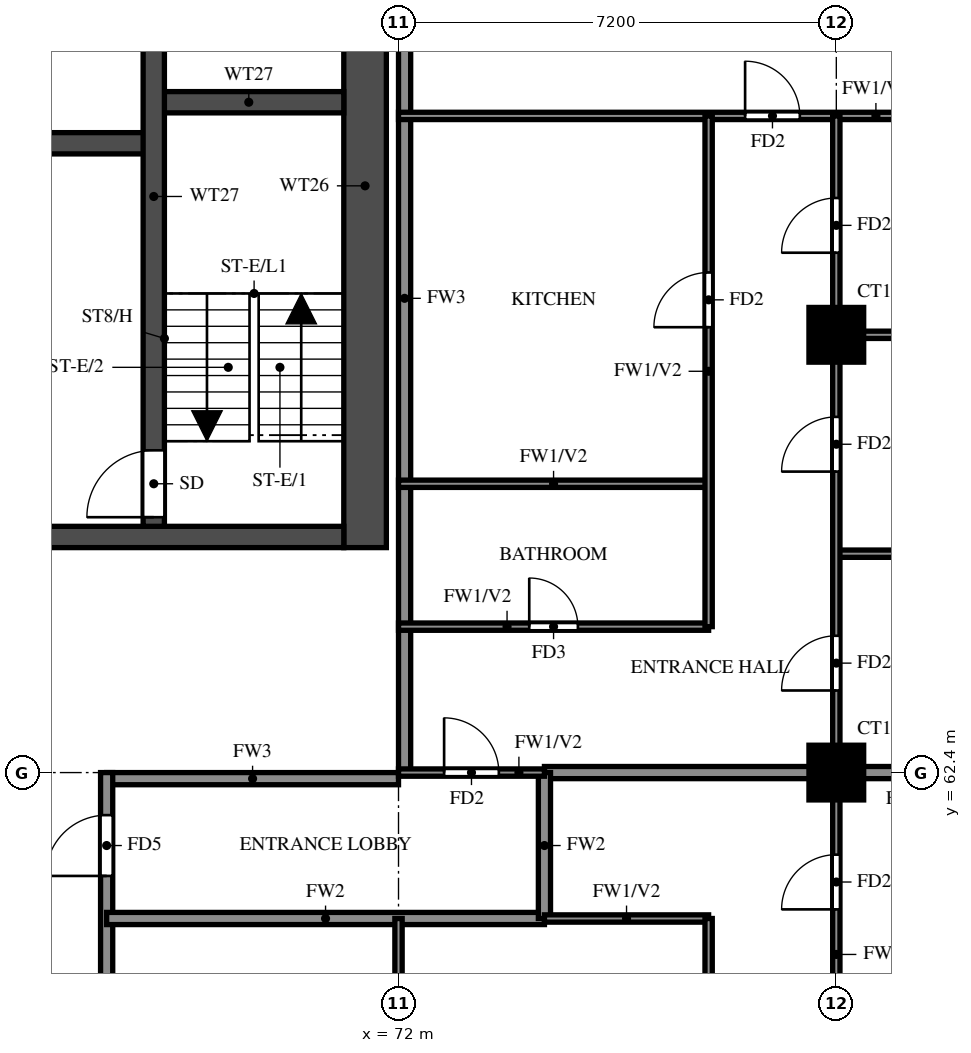
"""IFC4 building model, lengths in metres.
Left out: names, types, materials, properties, quantities, classifications, styles, units other than length and angle.
Written with IfcOpenShell. Run it as: python <this file> out.ifc"""

import sys

from ifc_helpers import new_model, si_unit, direction, frame, frame_2d, origin, origin_2d, place, context, subcontext, project, spatial, rectangle, extrude, source, transform, mapped, element, fill, save


model = new_model("IFC4")
c1 = context("Model", 3, precision=1e-05, world=origin(), true_north=direction((0.0, 1.0)))
c2 = subcontext(c1, "Body", "Model", "MODEL_VIEW")
j1 = project(units=[si_unit("LENGTHUNIT", "METRE"), si_unit("PLANEANGLEUNIT", "RADIAN")], contexts=[c1])
p1 = place(None, origin())
s1 = spatial("IfcSite", under=j1, at=p1, CompositionType="ELEMENT")
p2 = place(p1, origin())
s2 = spatial("IfcBuilding", under=s1, at=p2, CompositionType="ELEMENT")
p3 = place(p2, frame((0.0, 0.0, 188.5)))
s3 = spatial("IfcBuildingStorey", under=s2, at=p3, CompositionType="ELEMENT", Elevation=188.5)
m1 = source(origin(), c2, "Body", "SweptSolid", [
    extrude(rectangle(XDim=0.9, YDim=0.9, at=origin_2d()), origin(), (0.0, 0.0, 1.0), 3.2),
])
for number, where, z_axis, x_axis in (
    (1, (79.2, 62.4, 0.0), (0.0, 0.0, 1.0), (1.0, 0.0, 0.0)),
    (2, (79.2, 69.6, 0.0), (0.0, 0.0, 1.0), (1.0, 0.0, 0.0)),
):
    element("IfcColumn", number, at=place(p3, frame(where, z_axis=z_axis, x_axis=x_axis)), inside=s3, PredefinedType="COLUMN", context=c2, shape_type="MappedRepresentation", body=[
        mapped(m1, transform((0.0, 0.0, 0.0))),
    ])
p4 = place(p3, frame((71.45, 66.1, 0.0), z_axis=(0.0, 0.0, 1.0), x_axis=(0.0, 1.0, 0.0)))
e3 = element("IfcWall", 3, at=p4, inside=s3, PredefinedType="SHEAR", context=c2, shape_type="SweptSolid", body=[
    extrude(rectangle(XDim=11.9, YDim=0.7, at=frame_2d((5.95, 0.0))), origin(), (0.0, 0.0, 1.0), 3.2),
])
p5 = place(p3, frame((29.7, 66.275, 0.0), z_axis=(0.0, 0.0, 1.0), x_axis=(1.0, 0.0, 0.0)))
e4 = element("IfcWall", 4, at=p5, inside=s3, PredefinedType="SHEAR", context=c2, shape_type="SweptSolid", body=[
    extrude(rectangle(XDim=41.4, YDim=0.35, at=frame_2d((20.7, 0.0))), origin(), (0.0, 0.0, 1.0), 3.2),
])
p6 = place(p5, frame((0.925, 0.0, 0.0)))
e5 = element("IfcOpeningElement", 5, at=p6, cuts=e4, PredefinedType="OPENING", context=c2, shape_type="SweptSolid", body=[
    extrude(rectangle(XDim=1.1, YDim=2.1, at=frame_2d((0.55, 1.05))), frame((0.0, 0.185, 0.0), z_axis=(0.0, -1.0, 0.0), x_axis=(1.0, 0.0, 0.0)), (0.0, 0.0, 1.0), 0.37),
])
p7 = place(p5, frame((3.712, 0.0, 0.0)))
e6 = element("IfcOpeningElement", 6, at=p7, cuts=e4, PredefinedType="OPENING", context=c2, shape_type="SweptSolid", body=[
    extrude(rectangle(XDim=1.8, YDim=2.1, at=frame_2d((0.9, 1.05))), frame((0.0, 0.185, 0.0), z_axis=(0.0, -1.0, 0.0), x_axis=(1.0, 0.0, 0.0)), (0.0, 0.0, 1.0), 0.37),
])
p8 = place(p3, frame((32.825, 72.75, 0.0), z_axis=(0.0, 0.0, 1.0), x_axis=(1.0, 0.0, 0.0)))
e7 = element("IfcWall", 7, at=p8, inside=s3, PredefinedType="SHEAR", context=c2, shape_type="SweptSolid", body=[
    extrude(rectangle(XDim=35.15, YDim=0.35, at=frame_2d((17.575, 0.0))), origin(), (0.0, 0.0, 1.0), 3.2),
])
p9 = place(p8, frame((19.8, 0.0, 0.0)))
e8 = element("IfcOpeningElement", 8, at=p9, cuts=e7, PredefinedType="OPENING", context=c2, shape_type="SweptSolid", body=[
    extrude(rectangle(XDim=1.1, YDim=2.1, at=frame_2d((0.55, 1.05))), frame((0.0, 0.185, 0.0), z_axis=(0.0, -1.0, 0.0), x_axis=(1.0, 0.0, 0.0)), (0.0, 0.0, 1.0), 0.37),
])
p10 = place(p8, frame((27.7, 0.0, 0.0)))
e9 = element("IfcOpeningElement", 9, at=p10, cuts=e7, PredefinedType="OPENING", context=c2, shape_type="SweptSolid", body=[
    extrude(rectangle(XDim=1.1, YDim=2.1, at=frame_2d((0.55, 1.05))), frame((0.0, 0.185, 0.0), z_axis=(0.0, -1.0, 0.0), x_axis=(1.0, 0.0, 0.0)), (0.0, 0.0, 1.0), 0.37),
])
p11 = place(p8, frame((30.3, 0.0, 0.0)))
e10 = element("IfcOpeningElement", 10, at=p11, cuts=e7, PredefinedType="OPENING", context=c2, shape_type="SweptSolid", body=[
    extrude(rectangle(XDim=1.1, YDim=2.1, at=frame_2d((0.55, 1.05))), frame((0.0, 0.185, 0.0), z_axis=(0.0, -1.0, 0.0), x_axis=(1.0, 0.0, 0.0)), (0.0, 0.0, 1.0), 0.37),
])
p12 = place(p8, frame((3.8, 0.0, 0.0)))
e11 = element("IfcOpeningElement", 11, at=p12, cuts=e7, PredefinedType="OPENING", context=c2, shape_type="SweptSolid", body=[
    extrude(rectangle(XDim=1.1, YDim=2.1, at=frame_2d((0.55, 1.05))), frame((0.0, 0.185, 0.0), z_axis=(0.0, -1.0, 0.0), x_axis=(1.0, 0.0, 0.0)), (0.0, 0.0, 1.0), 0.37),
])
p13 = place(p8, frame((6.55, 0.0, 0.0)))
e12 = element("IfcOpeningElement", 12, at=p13, cuts=e7, PredefinedType="OPENING", context=c2, shape_type="SweptSolid", body=[
    extrude(rectangle(XDim=1.1, YDim=2.1, at=frame_2d((0.55, 1.05))), frame((0.0, 0.185, 0.0), z_axis=(0.0, -1.0, 0.0), x_axis=(1.0, 0.0, 0.0)), (0.0, 0.0, 1.0), 0.37),
])
p14 = place(p8, frame((9.3, 0.0, 0.0)))
e13 = element("IfcOpeningElement", 13, at=p14, cuts=e7, PredefinedType="OPENING", context=c2, shape_type="SweptSolid", body=[
    extrude(rectangle(XDim=1.1, YDim=2.1, at=frame_2d((0.55, 1.05))), frame((0.0, 0.185, 0.0), z_axis=(0.0, -1.0, 0.0), x_axis=(1.0, 0.0, 0.0)), (0.0, 0.0, 1.0), 0.37),
])
p15 = place(p8, frame((12.05, 0.0, 0.0)))
e14 = element("IfcOpeningElement", 14, at=p15, cuts=e7, PredefinedType="OPENING", context=c2, shape_type="SweptSolid", body=[
    extrude(rectangle(XDim=1.1, YDim=2.1, at=frame_2d((0.55, 1.05))), frame((0.0, 0.185, 0.0), z_axis=(0.0, -1.0, 0.0), x_axis=(1.0, 0.0, 0.0)), (0.0, 0.0, 1.0), 0.37),
])
p16 = place(p8, frame((14.8, 0.0, 0.0)))
e15 = element("IfcOpeningElement", 15, at=p16, cuts=e7, PredefinedType="OPENING", context=c2, shape_type="SweptSolid", body=[
    extrude(rectangle(XDim=1.1, YDim=2.1, at=frame_2d((0.55, 1.05))), frame((0.0, 0.185, 0.0), z_axis=(0.0, -1.0, 0.0), x_axis=(1.0, 0.0, 0.0)), (0.0, 0.0, 1.0), 0.37),
])
p17 = place(p8, frame((17.55, 0.0, 0.0)))
e16 = element("IfcOpeningElement", 16, at=p17, cuts=e7, PredefinedType="OPENING", context=c2, shape_type="SweptSolid", body=[
    extrude(rectangle(XDim=1.1, YDim=2.1, at=frame_2d((0.55, 1.05))), frame((0.0, 0.185, 0.0), z_axis=(0.0, -1.0, 0.0), x_axis=(1.0, 0.0, 0.0)), (0.0, 0.0, 1.0), 0.37),
])
p18 = place(p8, frame((0.938, 0.0, 0.0)))
e17 = element("IfcOpeningElement", 17, at=p18, cuts=e7, PredefinedType="OPENING", context=c2, shape_type="SweptSolid", body=[
    extrude(rectangle(XDim=1.1, YDim=2.1, at=frame_2d((0.55, 1.05))), frame((0.0, 0.185, 0.0), z_axis=(0.0, -1.0, 0.0), x_axis=(1.0, 0.0, 0.0)), (0.0, 0.0, 1.0), 0.37),
])
p19 = place(p3, frame((67.975, 73.425, 0.0), z_axis=(0.0, 0.0, 1.0), x_axis=(1.0, 0.0, 0.0)))
e18 = element("IfcWall", 18, at=p19, inside=s3, PredefinedType="SHEAR", context=c2, shape_type="SweptSolid", body=[
    extrude(rectangle(XDim=3.125, YDim=0.35, at=frame_2d((1.562, 0.0))), origin(), (0.0, 0.0, 1.0), 3.2),
])
p20 = place(p3, frame((67.975, 66.45, 0.0), z_axis=(0.0, 0.0, 1.0), x_axis=(0.0, 1.0, 0.0)))
e19 = element("IfcWall", 19, at=p20, inside=s3, PredefinedType="SHEAR", context=c2, shape_type="SweptSolid", body=[
    extrude(rectangle(XDim=10.85, YDim=0.35, at=frame_2d((5.425, 0.0))), origin(), (0.0, 0.0, 1.0), 3.2),
])
p21 = place(p20, frame((0.15, 0.0, 0.0)))
e20 = element("IfcOpeningElement", 20, at=p21, cuts=e19, PredefinedType="OPENING", context=c2, shape_type="SweptSolid", body=[
    extrude(rectangle(XDim=1.1, YDim=2.1, at=frame_2d((0.55, 1.05))), frame((0.0, 0.185, 0.0), z_axis=(0.0, -1.0, 0.0), x_axis=(1.0, 0.0, 0.0)), (0.0, 0.0, 1.0), 0.37),
])
p22 = place(p3, frame((67.2, 62.3, 0.0), z_axis=(0.0, 0.0, 1.0), x_axis=(1.0, 0.0, 0.0)))
e21 = element("IfcWall", 21, at=p22, inside=s3, PredefinedType="SOLIDWALL", context=c2, shape_type="SweptSolid", body=[
    extrude(rectangle(XDim=4.8, YDim=0.2, at=frame_2d((2.4, 0.0))), origin(), (0.0, 0.0, 1.0), 3.2),
])
p23 = place(p3, frame((67.2, 45.6, 0.0), z_axis=(0.0, 0.0, 1.0), x_axis=(0.0, 1.0, 0.0)))
e22 = element("IfcWall", 22, at=p23, inside=s3, PredefinedType="SOLIDWALL", context=c2, shape_type="SweptSolid", body=[
    extrude(rectangle(XDim=16.8, YDim=0.2, at=frame_2d((8.4, 0.0))), origin(), (0.0, 0.0, 1.0), 3.2),
])
p24 = place(p23, frame((8.3, 0.0, 0.0)))
e23 = element("IfcOpeningElement", 23, at=p24, cuts=e22, PredefinedType="OPENING", context=c2, shape_type="SweptSolid", body=[
    extrude(rectangle(XDim=1.0, YDim=2.1, at=frame_2d((0.5, 1.05))), frame((0.0, 0.11, 0.0), z_axis=(0.0, -1.0, 0.0), x_axis=(1.0, 0.0, 0.0)), (0.0, 0.0, 1.0), 0.22),
])
p25 = place(p23, frame((15.1, 0.0, 0.0)))
e24 = element("IfcOpeningElement", 24, at=p25, cuts=e22, PredefinedType="OPENING", context=c2, shape_type="SweptSolid", body=[
    extrude(rectangle(XDim=1.0, YDim=2.1, at=frame_2d((0.5, 1.05))), frame((0.0, 0.11, 0.0), z_axis=(0.0, -1.0, 0.0), x_axis=(1.0, 0.0, 0.0)), (0.0, 0.0, 1.0), 0.22),
])
p26 = place(p23, frame((0.7, 0.0, 0.0)))
e25 = element("IfcOpeningElement", 25, at=p26, cuts=e22, PredefinedType="OPENING", context=c2, shape_type="SweptSolid", body=[
    extrude(rectangle(XDim=1.0, YDim=2.1, at=frame_2d((0.5, 1.05))), frame((0.0, 0.11, 0.0), z_axis=(0.0, -1.0, 0.0), x_axis=(1.0, 0.0, 0.0)), (0.0, 0.0, 1.0), 0.22),
])
p27 = place(p3, frame((72.1, 62.4, 0.0), z_axis=(0.0, 0.0, 1.0), x_axis=(0.0, 1.0, 0.0)))
e26 = element("IfcWall", 26, at=p27, inside=s3, PredefinedType="SOLIDWALL", context=c2, shape_type="SweptSolid", body=[
    extrude(rectangle(XDim=15.6, YDim=0.2, at=frame_2d((7.8, 0.0))), origin(), (0.0, 0.0, 1.0), 3.2),
])
p28 = place(p3, frame((67.2, 60.0, 0.0), z_axis=(0.0, 0.0, 1.0), x_axis=(1.0, 0.0, 0.0)))
e27 = element("IfcWall", 27, at=p28, inside=s3, PredefinedType="SOLIDWALL", context=c2, shape_type="SweptSolid", body=[
    extrude(rectangle(XDim=7.2, YDim=0.2, at=frame_2d((3.6, 0.0))), origin(), (0.0, 0.0, 1.0), 3.2),
])
p29 = place(p3, frame((74.4, 62.4, 0.0), z_axis=(0.0, 0.0, 1.0), x_axis=(1.0, 0.0, 0.0)))
e28 = element("IfcWall", 28, at=p29, inside=s3, PredefinedType="SOLIDWALL", context=c2, shape_type="SweptSolid", body=[
    extrude(rectangle(XDim=11.875, YDim=0.2, at=frame_2d((5.938, 0.0))), origin(), (0.0, 0.0, 1.0), 3.2),
])
p30 = place(p3, frame((74.4, 60.0, 0.0), z_axis=(0.0, 0.0, 1.0), x_axis=(0.0, 1.0, 0.0)))
e29 = element("IfcWall", 29, at=p30, inside=s3, PredefinedType="SOLIDWALL", context=c2, shape_type="SweptSolid", body=[
    extrude(rectangle(XDim=2.4, YDim=0.2, at=frame_2d((1.2, 0.0))), origin(), (0.0, 0.0, 1.0), 3.2),
])
p31 = place(p3, frame((74.4, 60.0, 0.0), z_axis=(0.0, 0.0, 1.0), x_axis=(1.0, 0.0, 0.0)))
e30 = element("IfcWall", 30, at=p31, inside=s3, PredefinedType="PARTITIONING", context=c2, shape_type="SweptSolid", body=[
    extrude(rectangle(XDim=2.7, YDim=0.12, at=frame_2d((1.35, 0.0))), origin(), (0.0, 0.0, 1.0), 3.2),
])
p32 = place(p3, frame((72.0, 62.4, 0.0), z_axis=(0.0, 0.0, 1.0), x_axis=(1.0, 0.0, 0.0)))
e31 = element("IfcWall", 31, at=p32, inside=s3, PredefinedType="PARTITIONING", context=c2, shape_type="SweptSolid", body=[
    extrude(rectangle(XDim=2.4, YDim=0.12, at=frame_2d((1.2, 0.0))), origin(), (0.0, 0.0, 1.0), 3.2),
])
p33 = place(p32, frame((0.75, 0.0, 0.0)))
e32 = element("IfcOpeningElement", 32, at=p33, cuts=e31, PredefinedType="OPENING", context=c2, shape_type="SweptSolid", body=[
    extrude(rectangle(XDim=0.9, YDim=2.1, at=frame_2d((0.45, 1.05))), frame((0.0, 0.07, 0.0), z_axis=(0.0, -1.0, 0.0), x_axis=(1.0, 0.0, 0.0)), (0.0, 0.0, 1.0), 0.14),
])
p34 = place(p3, frame((72.0, 64.8, 0.0), z_axis=(0.0, 0.0, 1.0), x_axis=(1.0, 0.0, 0.0)))
e33 = element("IfcWall", 33, at=p34, inside=s3, PredefinedType="PARTITIONING", context=c2, shape_type="SweptSolid", body=[
    extrude(rectangle(XDim=5.1, YDim=0.12, at=frame_2d((2.55, 0.0))), origin(), (0.0, 0.0, 1.0), 3.2),
])
p35 = place(p34, frame((2.15, 0.0, 0.0)))
e34 = element("IfcOpeningElement", 34, at=p35, cuts=e33, PredefinedType="OPENING", context=c2, shape_type="SweptSolid", body=[
    extrude(rectangle(XDim=0.8, YDim=2.1, at=frame_2d((0.4, 1.05))), frame((0.0, 0.07, 0.0), z_axis=(0.0, -1.0, 0.0), x_axis=(1.0, 0.0, 0.0)), (0.0, 0.0, 1.0), 0.14),
])
p36 = place(p3, frame((79.2, 66.0, 0.0), z_axis=(0.0, 0.0, 1.0), x_axis=(1.0, 0.0, 0.0)))
e35 = element("IfcWall", 35, at=p36, inside=s3, PredefinedType="PARTITIONING", context=c2, shape_type="SweptSolid", body=[
    extrude(rectangle(XDim=7.075, YDim=0.12, at=frame_2d((3.538, 0.0))), origin(), (0.0, 0.0, 1.0), 2.3),
])
p37 = place(p3, frame((72.0, 67.15, 0.0), z_axis=(0.0, 0.0, 1.0), x_axis=(1.0, 0.0, 0.0)))
e36 = element("IfcWall", 36, at=p37, inside=s3, PredefinedType="PARTITIONING", context=c2, shape_type="SweptSolid", body=[
    extrude(rectangle(XDim=5.1, YDim=0.12, at=frame_2d((2.55, 0.0))), origin(), (0.0, 0.0, 1.0), 3.2),
])
p38 = place(p3, frame((79.2, 69.6, 0.0), z_axis=(0.0, 0.0, 1.0), x_axis=(1.0, 0.0, 0.0)))
e37 = element("IfcWall", 37, at=p38, inside=s3, PredefinedType="PARTITIONING", context=c2, shape_type="SweptSolid", body=[
    extrude(rectangle(XDim=7.075, YDim=0.12, at=frame_2d((3.538, 0.0))), origin(), (0.0, 0.0, 1.0), 3.2),
])
p39 = place(p3, frame((72.0, 73.2, 0.0), z_axis=(0.0, 0.0, 1.0), x_axis=(1.0, 0.0, 0.0)))
e38 = element("IfcWall", 38, at=p39, inside=s3, PredefinedType="PARTITIONING", context=c2, shape_type="SweptSolid", body=[
    extrude(rectangle(XDim=14.275, YDim=0.12, at=frame_2d((7.137, 0.0))), origin(), (0.0, 0.0, 1.0), 2.3),
])
p40 = place(p39, frame((5.7, 0.0, 0.0)))
e39 = element("IfcOpeningElement", 39, at=p40, cuts=e38, PredefinedType="OPENING", context=c2, shape_type="SweptSolid", body=[
    extrude(rectangle(XDim=0.9, YDim=2.1, at=frame_2d((0.45, 1.05))), frame((0.0, 0.07, 0.0), z_axis=(0.0, -1.0, 0.0), x_axis=(1.0, 0.0, 0.0)), (0.0, 0.0, 1.0), 0.14),
])
for number, where, z_axis, x_axis in (
    (40, (72.0, 55.6, 0.0), (0.0, 0.0, 1.0), (0.0, 1.0, 0.0)),
    (41, (77.1, 55.6, 0.0), (0.0, 0.0, 1.0), (0.0, 1.0, 0.0)),
):
    element("IfcWall", number, at=place(p3, frame(where, z_axis=z_axis, x_axis=x_axis)), inside=s3, PredefinedType="PARTITIONING", context=c2, shape_type="SweptSolid", body=[
        extrude(rectangle(XDim=4.4, YDim=0.12, at=frame_2d((2.2, 0.0))), origin(), (0.0, 0.0, 1.0), 3.2),
    ])
p41 = place(p3, frame((77.1, 64.8, 0.0), z_axis=(0.0, 0.0, 1.0), x_axis=(0.0, 1.0, 0.0)))
e42 = element("IfcWall", 42, at=p41, inside=s3, PredefinedType="PARTITIONING", context=c2, shape_type="SweptSolid", body=[
    extrude(rectangle(XDim=8.4, YDim=0.12, at=frame_2d((4.2, 0.0))), origin(), (0.0, 0.0, 1.0), 3.2),
])
p42 = place(p41, frame((4.925, 0.0, 0.0)))
e43 = element("IfcOpeningElement", 43, at=p42, cuts=e42, PredefinedType="OPENING", context=c2, shape_type="SweptSolid", body=[
    extrude(rectangle(XDim=0.9, YDim=2.1, at=frame_2d((0.45, 1.05))), frame((0.0, 0.07, 0.0), z_axis=(0.0, -1.0, 0.0), x_axis=(1.0, 0.0, 0.0)), (0.0, 0.0, 1.0), 0.14),
])
p43 = place(p3, frame((79.2, 48.125, 0.0), z_axis=(0.0, 0.0, 1.0), x_axis=(0.0, 1.0, 0.0)))
e44 = element("IfcWall", 44, at=p43, inside=s3, PredefinedType="PARTITIONING", context=c2, shape_type="SweptSolid", body=[
    extrude(rectangle(XDim=25.075, YDim=0.12, at=frame_2d((12.538, 0.0))), origin(), (0.0, 0.0, 1.0), 3.2),
])
p44 = place(p43, frame((1.288, 0.0, 0.0)))
e45 = element("IfcOpeningElement", 45, at=p44, cuts=e44, PredefinedType="OPENING", context=c2, shape_type="SweptSolid", body=[
    extrude(rectangle(XDim=0.9, YDim=2.1, at=frame_2d((0.45, 1.05))), frame((0.0, 0.07, 0.0), z_axis=(0.0, -1.0, 0.0), x_axis=(1.0, 0.0, 0.0)), (0.0, 0.0, 1.0), 0.14),
])
p45 = place(p43, frame((7.825, 0.0, 0.0)))
e46 = element("IfcOpeningElement", 46, at=p45, cuts=e44, PredefinedType="OPENING", context=c2, shape_type="SweptSolid", body=[
    extrude(rectangle(XDim=1.5, YDim=2.1, at=frame_2d((0.75, 1.05))), frame((0.0, 0.07, 0.0), z_axis=(0.0, -1.0, 0.0), x_axis=(1.0, 0.0, 0.0)), (0.0, 0.0, 1.0), 0.14),
])
p46 = place(p43, frame((12.025, 0.0, 0.0)))
e47 = element("IfcOpeningElement", 47, at=p46, cuts=e44, PredefinedType="OPENING", context=c2, shape_type="SweptSolid", body=[
    extrude(rectangle(XDim=0.9, YDim=2.1, at=frame_2d((0.45, 1.05))), frame((0.0, 0.07, 0.0), z_axis=(0.0, -1.0, 0.0), x_axis=(1.0, 0.0, 0.0)), (0.0, 0.0, 1.0), 0.14),
])
p47 = place(p43, frame((15.625, 0.0, 0.0)))
e48 = element("IfcOpeningElement", 48, at=p47, cuts=e44, PredefinedType="OPENING", context=c2, shape_type="SweptSolid", body=[
    extrude(rectangle(XDim=0.9, YDim=2.1, at=frame_2d((0.45, 1.05))), frame((0.0, 0.07, 0.0), z_axis=(0.0, -1.0, 0.0), x_axis=(1.0, 0.0, 0.0)), (0.0, 0.0, 1.0), 0.14),
])
p48 = place(p43, frame((19.225, 0.0, 0.0)))
e49 = element("IfcOpeningElement", 49, at=p48, cuts=e44, PredefinedType="OPENING", context=c2, shape_type="SweptSolid", body=[
    extrude(rectangle(XDim=0.9, YDim=2.1, at=frame_2d((0.45, 1.05))), frame((0.0, 0.07, 0.0), z_axis=(0.0, -1.0, 0.0), x_axis=(1.0, 0.0, 0.0)), (0.0, 0.0, 1.0), 0.14),
])
p49 = place(p43, frame((22.825, 0.0, 0.0)))
e50 = element("IfcOpeningElement", 50, at=p49, cuts=e44, PredefinedType="OPENING", context=c2, shape_type="SweptSolid", body=[
    extrude(rectangle(XDim=0.9, YDim=2.1, at=frame_2d((0.45, 1.05))), frame((0.0, 0.07, 0.0), z_axis=(0.0, -1.0, 0.0), x_axis=(1.0, 0.0, 0.0)), (0.0, 0.0, 1.0), 0.14),
])
p50 = place(p21, origin())
e51 = element("IfcDoor", 51, at=p50, inside=s3, OperationType="SINGLE_SWING_LEFT", PredefinedType="DOOR", context=c2, shape_type="SweptSolid", body=[
    extrude(rectangle(XDim=1.1, YDim=2.1, at=frame_2d((0.55, 1.05))), frame((0.0, 0.025, 0.0), z_axis=(0.0, -1.0, 0.0), x_axis=(1.0, 0.0, 0.0)), (0.0, 0.0, 1.0), 0.05),
])
fill(e20, e51)
p51 = place(p46, origin())
e52 = element("IfcDoor", 52, at=p51, inside=s3, OperationType="SINGLE_SWING_LEFT", PredefinedType="DOOR", context=c2, shape_type="SweptSolid", body=[
    extrude(rectangle(XDim=0.9, YDim=2.1, at=frame_2d((0.45, 1.05))), frame((0.0, 0.025, 0.0), z_axis=(0.0, -1.0, 0.0), x_axis=(1.0, 0.0, 0.0)), (0.0, 0.0, 1.0), 0.05),
])
fill(e47, e52)
p52 = place(p33, origin())
e53 = element("IfcDoor", 53, at=p52, inside=s3, OperationType="SINGLE_SWING_LEFT", PredefinedType="DOOR", context=c2, shape_type="SweptSolid", body=[
    extrude(rectangle(XDim=0.9, YDim=2.1, at=frame_2d((0.45, 1.05))), frame((0.0, 0.025, 0.0), z_axis=(0.0, -1.0, 0.0), x_axis=(1.0, 0.0, 0.0)), (0.0, 0.0, 1.0), 0.05),
])
fill(e32, e53)
p53 = place(p25, origin())
e54 = element("IfcDoor", 54, at=p53, inside=s3, OperationType="SINGLE_SWING_RIGHT", PredefinedType="DOOR", context=c2, shape_type="SweptSolid", body=[
    extrude(rectangle(XDim=1.0, YDim=2.1, at=frame_2d((0.5, 1.05))), frame((0.0, 0.025, 0.0), z_axis=(0.0, -1.0, 0.0), x_axis=(1.0, 0.0, 0.0)), (0.0, 0.0, 1.0), 0.05),
])
fill(e24, e54)
p54 = place(p47, origin())
e55 = element("IfcDoor", 55, at=p54, inside=s3, OperationType="SINGLE_SWING_LEFT", PredefinedType="DOOR", context=c2, shape_type="SweptSolid", body=[
    extrude(rectangle(XDim=0.9, YDim=2.1, at=frame_2d((0.45, 1.05))), frame((0.0, 0.025, 0.0), z_axis=(0.0, -1.0, 0.0), x_axis=(1.0, 0.0, 0.0)), (0.0, 0.0, 1.0), 0.05),
])
fill(e48, e55)
p55 = place(p48, origin())
e56 = element("IfcDoor", 56, at=p55, inside=s3, OperationType="SINGLE_SWING_LEFT", PredefinedType="DOOR", context=c2, shape_type="SweptSolid", body=[
    extrude(rectangle(XDim=0.9, YDim=2.1, at=frame_2d((0.45, 1.05))), frame((0.0, 0.025, 0.0), z_axis=(0.0, -1.0, 0.0), x_axis=(1.0, 0.0, 0.0)), (0.0, 0.0, 1.0), 0.05),
])
fill(e49, e56)
p56 = place(p49, origin())
e57 = element("IfcDoor", 57, at=p56, inside=s3, OperationType="SINGLE_SWING_RIGHT", PredefinedType="DOOR", context=c2, shape_type="SweptSolid", body=[
    extrude(rectangle(XDim=0.9, YDim=2.1, at=frame_2d((0.45, 1.05))), frame((0.0, 0.025, 0.0), z_axis=(0.0, -1.0, 0.0), x_axis=(1.0, 0.0, 0.0)), (0.0, 0.0, 1.0), 0.05),
])
fill(e50, e57)
p57 = place(p40, origin())
e58 = element("IfcDoor", 58, at=p57, inside=s3, OperationType="SINGLE_SWING_LEFT", PredefinedType="DOOR", context=c2, shape_type="SweptSolid", body=[
    extrude(rectangle(XDim=0.9, YDim=2.1, at=frame_2d((0.45, 1.05))), frame((0.0, 0.025, 0.0), z_axis=(0.0, -1.0, 0.0), x_axis=(1.0, 0.0, 0.0)), (0.0, 0.0, 1.0), 0.05),
])
fill(e39, e58)
p58 = place(p35, origin())
e59 = element("IfcDoor", 59, at=p58, inside=s3, OperationType="SINGLE_SWING_LEFT", PredefinedType="DOOR", context=c2, shape_type="SweptSolid", body=[
    extrude(rectangle(XDim=0.8, YDim=2.1, at=frame_2d((0.4, 1.05))), frame((0.0, 0.025, 0.0), z_axis=(0.0, -1.0, 0.0), x_axis=(1.0, 0.0, 0.0)), (0.0, 0.0, 1.0), 0.05),
])
fill(e34, e59)
p59 = place(p42, origin())
e60 = element("IfcDoor", 60, at=p59, inside=s3, OperationType="SINGLE_SWING_RIGHT", PredefinedType="DOOR", context=c2, shape_type="SweptSolid", body=[
    extrude(rectangle(XDim=0.9, YDim=2.1, at=frame_2d((0.45, 1.05))), frame((0.0, 0.025, 0.0), z_axis=(0.0, -1.0, 0.0), x_axis=(1.0, 0.0, 0.0)), (0.0, 0.0, 1.0), 0.05),
])
fill(e43, e60)
save(model, sys.argv[1])
